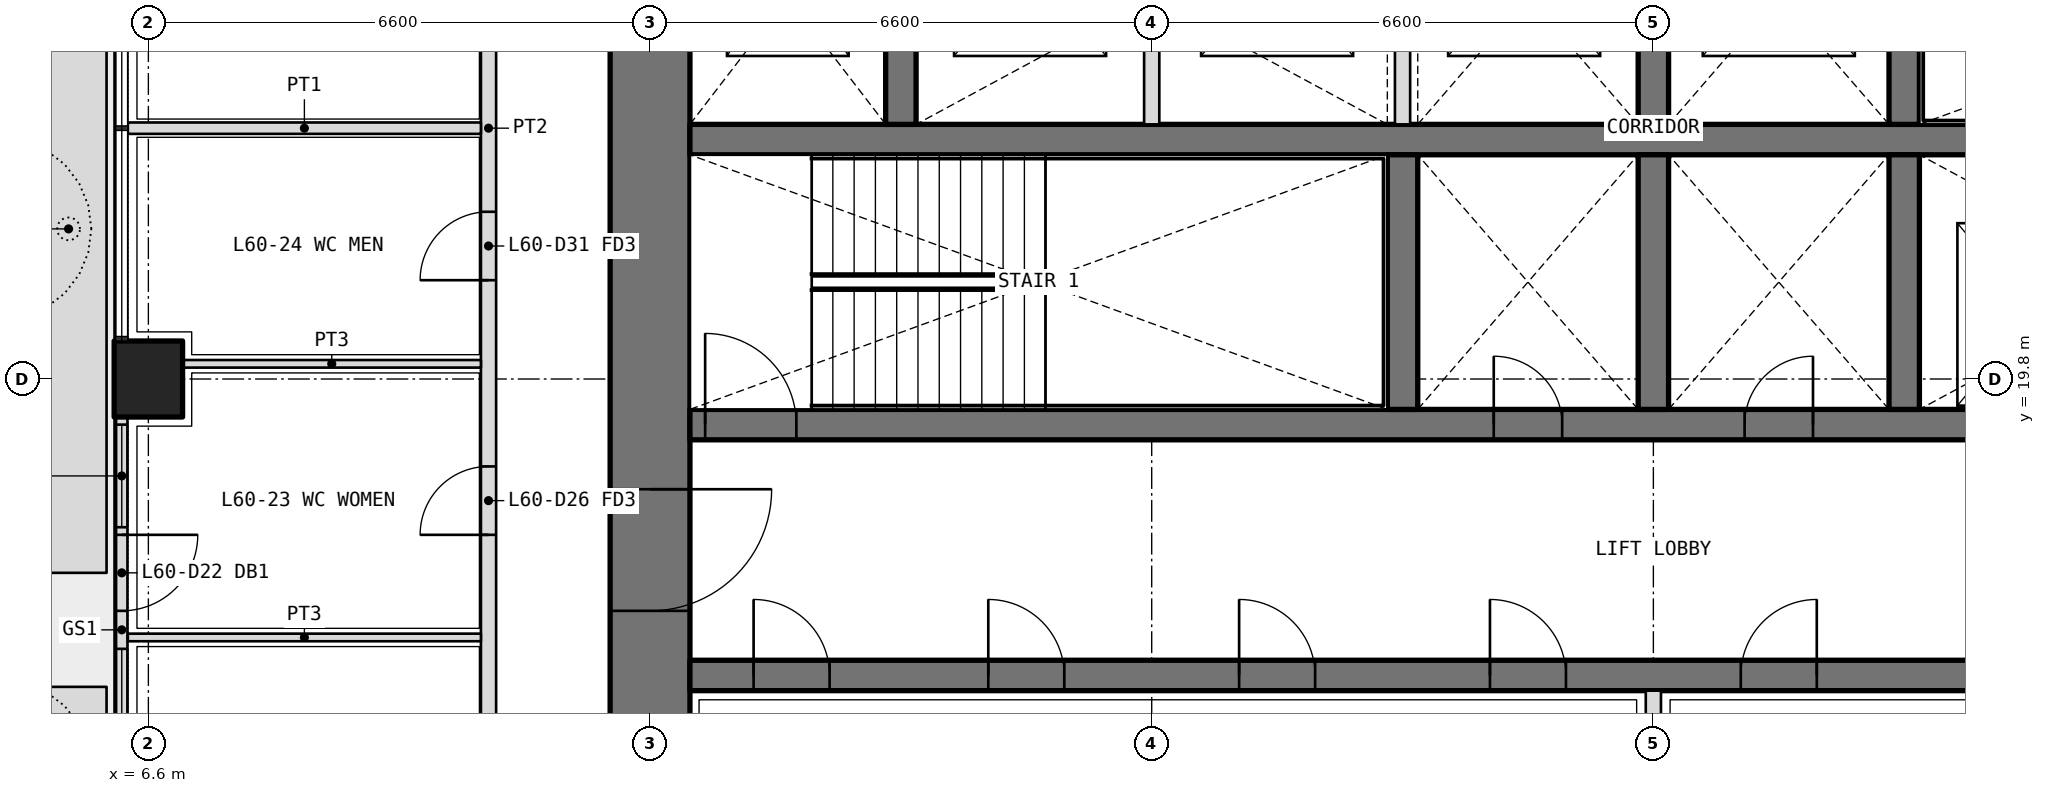
"""IFC4 building model, lengths in metres.
Left out: names, types, materials, properties, quantities, classifications, styles, units other than length and angle.
Written with IfcOpenShell. Run it as: python <this file> out.ifc"""

import sys

from ifc_helpers import new_model, si_unit, direction, frame, frame_2d, origin, origin_2d, place, context, subcontext, project, spatial, polyline, rectangle, outline, extrude, element, fill, save


model = new_model("IFC4")
c1 = context("Model", 3, precision=1e-05, world=origin(), true_north=direction((0.0, 1.0)))
c2 = subcontext(c1, "Body", "Model", "MODEL_VIEW")
j1 = project(units=[si_unit("LENGTHUNIT", "METRE"), si_unit("PLANEANGLEUNIT", "RADIAN")], contexts=[c1])
p1 = place(None, origin())
s1 = spatial("IfcSite", under=j1, at=p1, CompositionType="ELEMENT")
p2 = place(p1, origin())
s2 = spatial("IfcBuilding", under=s1, at=p2, CompositionType="ELEMENT")
p3 = place(p2, frame((0.0, 0.0, 262.8)))
s3 = spatial("IfcBuildingStorey", under=s2, at=p3, CompositionType="ELEMENT", Elevation=262.8)
p4 = place(p3, frame((6.6, 19.8, 0.0), z_axis=(0.0, 0.0, 1.0), x_axis=(0.0, 1.0, 0.0)))
e1 = element("IfcColumn", 1, at=p4, inside=s3, PredefinedType="COLUMN", context=c2, shape_type="SweptSolid", body=[
    extrude(rectangle(XDim=1.0, YDim=0.9, at=origin_2d()), origin(), (0.0, 0.0, 1.0), 4.2),
])
p5 = place(p3, origin())
e2 = element("IfcWall", 2, at=p5, inside=s3, PredefinedType="USERDEFINED", context=c2, shape_type="SweptSolid", body=[
    extrude(outline(polyline([(5.05, 13.3), (6.05, 13.3), (6.05, 15.75), (5.05, 15.75), (5.05, 13.3)]), holes=[polyline([(5.2, 13.45), (5.9, 13.45), (5.9, 15.6), (5.2, 15.6), (5.2, 13.45)])]), origin(), (0.0, 0.0, 1.0), 1.05),
])
p6 = place(p3, origin())
e3 = element("IfcWall", 3, at=p6, inside=s3, PredefinedType="USERDEFINED", context=c2, shape_type="SweptSolid", body=[
    extrude(outline(polyline([(5.05, 17.25), (6.05, 17.25), (6.05, 26.3), (5.05, 26.3), (5.05, 17.25)]), holes=[polyline([(5.2, 17.4), (5.9, 17.4), (5.9, 26.15), (5.2, 26.15), (5.2, 17.4)])]), origin(), (0.0, 0.0, 1.0), 1.05),
])
p7 = place(p3, frame((6.25, 19.3, 0.0), z_axis=(0.0, 0.0, 1.0), x_axis=(0.0, -1.0, 0.0)))
e4 = element("IfcWall", 4, at=p7, inside=s3, PredefinedType="SOLIDWALL", context=c2, shape_type="SweptSolid", body=[
    extrude(rectangle(XDim=5.6, YDim=0.15, at=frame_2d((2.8, 0.0))), origin(), (0.0, 0.0, 1.0), 2.7),
])
p8 = place(p7, frame((1.55, 0.0, 0.0)))
e5 = element("IfcOpeningElement", 5, at=p8, cuts=e4, PredefinedType="OPENING", context=c2, shape_type="SweptSolid", body=[
    extrude(rectangle(XDim=1.0, YDim=2.4, at=frame_2d((0.5, 1.2))), frame((0.0, 0.085, 0.0), z_axis=(0.0, -1.0, 0.0), x_axis=(1.0, 0.0, 0.0)), (0.0, 0.0, 1.0), 0.17),
])
p9 = place(p7, frame((0.1, 0.0, 0.1)))
e6 = element("IfcOpeningElement", 6, at=p9, cuts=e4, PredefinedType="OPENING", context=c2, shape_type="SweptSolid", body=[
    extrude(rectangle(XDim=1.35, YDim=2.3, at=frame_2d((0.675, 1.15))), frame((0.0, 0.085, 0.0), z_axis=(0.0, -1.0, 0.0), x_axis=(1.0, 0.0, 0.0)), (0.0, 0.0, 1.0), 0.17),
])
p10 = place(p7, frame((3.05, 0.0, 0.1)))
e7 = element("IfcOpeningElement", 7, at=p10, cuts=e4, PredefinedType="OPENING", context=c2, shape_type="SweptSolid", body=[
    extrude(rectangle(XDim=2.45, YDim=2.3, at=frame_2d((1.225, 1.15))), frame((0.0, 0.085, 0.0), z_axis=(0.0, -1.0, 0.0), x_axis=(1.0, 0.0, 0.0)), (0.0, 0.0, 1.0), 0.17),
])
p11 = place(p3, frame((13.2, 32.475, 0.0), z_axis=(0.0, 0.0, 1.0), x_axis=(0.0, -1.0, 0.0)))
e8 = element("IfcWall", 8, at=p11, inside=s3, PredefinedType="SHEAR", context=c2, shape_type="SweptSolid", body=[
    extrude(rectangle(XDim=18.75, YDim=1.05, at=frame_2d((9.375, 0.0))), origin(), (0.0, 0.0, 1.0), 4.2),
])
p12 = place(p11, frame((14.125, 0.0, 0.0)))
e9 = element("IfcOpeningElement", 9, at=p12, cuts=e8, PredefinedType="OPENING", context=c2, shape_type="SweptSolid", body=[
    extrude(rectangle(XDim=1.6, YDim=2.1, at=frame_2d((0.8, 1.05))), frame((0.0, 0.535, 0.0), z_axis=(0.0, -1.0, 0.0), x_axis=(1.0, 0.0, 0.0)), (0.0, 0.0, 1.0), 1.07),
])
p13 = place(p11, frame((3.325, 0.0, 0.0)))
e10 = element("IfcOpeningElement", 10, at=p13, cuts=e8, PredefinedType="OPENING", context=c2, shape_type="SweptSolid", body=[
    extrude(rectangle(XDim=1.6, YDim=2.1, at=frame_2d((0.8, 1.05))), frame((0.0, 0.535, 0.0), z_axis=(0.0, -1.0, 0.0), x_axis=(1.0, 0.0, 0.0)), (0.0, 0.0, 1.0), 1.07),
])
p14 = place(p3, frame((13.725, 15.9, 0.0), z_axis=(0.0, 0.0, 1.0), x_axis=(1.0, 0.0, 0.0)))
e11 = element("IfcWall", 11, at=p14, inside=s3, PredefinedType="SHEAR", context=c2, shape_type="SweptSolid", body=[
    extrude(rectangle(XDim=25.35, YDim=0.4, at=frame_2d((12.675, 0.0))), origin(), (0.0, 0.0, 1.0), 4.2),
])
p15 = place(p14, frame((0.837, 0.0, 0.0)))
e12 = element("IfcOpeningElement", 12, at=p15, cuts=e11, PredefinedType="OPENING", context=c2, shape_type="SweptSolid", body=[
    extrude(rectangle(XDim=1.0, YDim=2.1, at=frame_2d((0.5, 1.05))), frame((0.0, 0.21, 0.0), z_axis=(0.0, -1.0, 0.0), x_axis=(1.0, 0.0, 0.0)), (0.0, 0.0, 1.0), 0.42),
])
p16 = place(p14, frame((3.925, 0.0, 0.0)))
e13 = element("IfcOpeningElement", 13, at=p16, cuts=e11, PredefinedType="OPENING", context=c2, shape_type="SweptSolid", body=[
    extrude(rectangle(XDim=1.0, YDim=2.1, at=frame_2d((0.5, 1.05))), frame((0.0, 0.21, 0.0), z_axis=(0.0, -1.0, 0.0), x_axis=(1.0, 0.0, 0.0)), (0.0, 0.0, 1.0), 0.42),
])
p17 = place(p14, frame((7.225, 0.0, 0.0)))
e14 = element("IfcOpeningElement", 14, at=p17, cuts=e11, PredefinedType="OPENING", context=c2, shape_type="SweptSolid", body=[
    extrude(rectangle(XDim=1.0, YDim=2.1, at=frame_2d((0.5, 1.05))), frame((0.0, 0.21, 0.0), z_axis=(0.0, -1.0, 0.0), x_axis=(1.0, 0.0, 0.0)), (0.0, 0.0, 1.0), 0.42),
])
p18 = place(p14, frame((10.525, 0.0, 0.0)))
e15 = element("IfcOpeningElement", 15, at=p18, cuts=e11, PredefinedType="OPENING", context=c2, shape_type="SweptSolid", body=[
    extrude(rectangle(XDim=1.0, YDim=2.1, at=frame_2d((0.5, 1.05))), frame((0.0, 0.21, 0.0), z_axis=(0.0, -1.0, 0.0), x_axis=(1.0, 0.0, 0.0)), (0.0, 0.0, 1.0), 0.42),
])
p19 = place(p14, frame((13.825, 0.0, 0.0)))
e16 = element("IfcOpeningElement", 16, at=p19, cuts=e11, PredefinedType="OPENING", context=c2, shape_type="SweptSolid", body=[
    extrude(rectangle(XDim=1.0, YDim=2.1, at=frame_2d((0.5, 1.05))), frame((0.0, 0.21, 0.0), z_axis=(0.0, -1.0, 0.0), x_axis=(1.0, 0.0, 0.0)), (0.0, 0.0, 1.0), 0.42),
])
p20 = place(p14, frame((17.125, 0.0, 0.0)))
e17 = element("IfcOpeningElement", 17, at=p20, cuts=e11, PredefinedType="OPENING", context=c2, shape_type="SweptSolid", body=[
    extrude(rectangle(XDim=1.0, YDim=2.1, at=frame_2d((0.5, 1.05))), frame((0.0, 0.21, 0.0), z_axis=(0.0, -1.0, 0.0), x_axis=(1.0, 0.0, 0.0)), (0.0, 0.0, 1.0), 0.42),
])
p21 = place(p14, frame((20.425, 0.0, 0.0)))
e18 = element("IfcOpeningElement", 18, at=p21, cuts=e11, PredefinedType="OPENING", context=c2, shape_type="SweptSolid", body=[
    extrude(rectangle(XDim=1.0, YDim=2.1, at=frame_2d((0.5, 1.05))), frame((0.0, 0.21, 0.0), z_axis=(0.0, -1.0, 0.0), x_axis=(1.0, 0.0, 0.0)), (0.0, 0.0, 1.0), 0.42),
])
p22 = place(p14, frame((23.512, 0.0, 0.0)))
e19 = element("IfcOpeningElement", 19, at=p22, cuts=e11, PredefinedType="OPENING", context=c2, shape_type="SweptSolid", body=[
    extrude(rectangle(XDim=1.0, YDim=2.1, at=frame_2d((0.5, 1.05))), frame((0.0, 0.21, 0.0), z_axis=(0.0, -1.0, 0.0), x_axis=(1.0, 0.0, 0.0)), (0.0, 0.0, 1.0), 0.42),
])
p23 = place(p3, frame((13.725, 19.2, 0.0), z_axis=(0.0, 0.0, 1.0), x_axis=(1.0, 0.0, 0.0)))
e20 = element("IfcWall", 20, at=p23, inside=s3, PredefinedType="SHEAR", context=c2, shape_type="SweptSolid", body=[
    extrude(rectangle(XDim=25.35, YDim=0.4, at=frame_2d((12.675, 0.0))), origin(), (0.0, 0.0, 1.0), 4.2),
])
p24 = place(p23, frame((10.575, 0.0, 0.0)))
e21 = element("IfcOpeningElement", 21, at=p24, cuts=e20, PredefinedType="OPENING", context=c2, shape_type="SweptSolid", body=[
    extrude(rectangle(XDim=0.9, YDim=2.1, at=frame_2d((0.45, 1.05))), frame((0.0, 0.21, 0.0), z_axis=(0.0, -1.0, 0.0), x_axis=(1.0, 0.0, 0.0)), (0.0, 0.0, 1.0), 0.42),
])
p25 = place(p23, frame((13.875, 0.0, 0.0)))
e22 = element("IfcOpeningElement", 22, at=p25, cuts=e20, PredefinedType="OPENING", context=c2, shape_type="SweptSolid", body=[
    extrude(rectangle(XDim=0.9, YDim=2.1, at=frame_2d((0.45, 1.05))), frame((0.0, 0.21, 0.0), z_axis=(0.0, -1.0, 0.0), x_axis=(1.0, 0.0, 0.0)), (0.0, 0.0, 1.0), 0.42),
])
p26 = place(p23, frame((0.2, 0.0, 0.0)))
e23 = element("IfcOpeningElement", 23, at=p26, cuts=e20, PredefinedType="OPENING", context=c2, shape_type="SweptSolid", body=[
    extrude(rectangle(XDim=1.2, YDim=2.1, at=frame_2d((0.6, 1.05))), frame((0.0, 0.21, 0.0), z_axis=(0.0, -1.0, 0.0), x_axis=(1.0, 0.0, 0.0)), (0.0, 0.0, 1.0), 0.42),
])
p27 = place(p23, frame((23.512, 0.0, 0.0)))
e24 = element("IfcOpeningElement", 24, at=p27, cuts=e20, PredefinedType="OPENING", context=c2, shape_type="SweptSolid", body=[
    extrude(rectangle(XDim=1.1, YDim=2.1, at=frame_2d((0.55, 1.05))), frame((0.0, 0.21, 0.0), z_axis=(0.0, -1.0, 0.0), x_axis=(1.0, 0.0, 0.0)), (0.0, 0.0, 1.0), 0.42),
])
p28 = place(p23, frame((17.125, 0.0, 0.0)))
e25 = element("IfcOpeningElement", 25, at=p28, cuts=e20, PredefinedType="OPENING", context=c2, shape_type="SweptSolid", body=[
    extrude(rectangle(XDim=1.1, YDim=2.1, at=frame_2d((0.55, 1.05))), frame((0.0, 0.21, 0.0), z_axis=(0.0, -1.0, 0.0), x_axis=(1.0, 0.0, 0.0)), (0.0, 0.0, 1.0), 0.42),
])
p29 = place(p23, frame((20.325, 0.0, 0.0)))
e26 = element("IfcOpeningElement", 26, at=p29, cuts=e20, PredefinedType="OPENING", context=c2, shape_type="SweptSolid", body=[
    extrude(rectangle(XDim=1.1, YDim=2.1, at=frame_2d((0.55, 1.05))), frame((0.0, 0.21, 0.0), z_axis=(0.0, -1.0, 0.0), x_axis=(1.0, 0.0, 0.0)), (0.0, 0.0, 1.0), 0.42),
])
p30 = place(p3, frame((13.725, 22.95, 0.0), z_axis=(0.0, 0.0, 1.0), x_axis=(1.0, 0.0, 0.0)))
e27 = element("IfcWall", 27, at=p30, inside=s3, PredefinedType="SHEAR", context=c2, shape_type="SweptSolid", body=[
    extrude(rectangle(XDim=25.35, YDim=0.4, at=frame_2d((12.675, 0.0))), origin(), (0.0, 0.0, 1.0), 4.2),
])
for number, where, z_axis, x_axis in (
    (28, (23.1, 19.4, 0.0), (0.0, 0.0, 1.0), (0.0, 1.0, 0.0)),
    (29, (26.4, 19.4, 0.0), (0.0, 0.0, 1.0), (0.0, 1.0, 0.0)),
    (30, (29.7, 19.4, 0.0), (0.0, 0.0, 1.0), (0.0, 1.0, 0.0)),
    (31, (16.5, 23.15, 0.0), (0.0, 0.0, 1.0), (0.0, 1.0, 0.0)),
    (32, (26.4, 23.15, 0.0), (0.0, 0.0, 1.0), (0.0, 1.0, 0.0)),
    (33, (29.7, 23.15, 0.0), (0.0, 0.0, 1.0), (0.0, 1.0, 0.0)),
):
    element("IfcWall", number, at=place(p3, frame(where, z_axis=z_axis, x_axis=x_axis)), inside=s3, PredefinedType="SHEAR", context=c2, shape_type="SweptSolid", body=[
        extrude(rectangle(XDim=3.35, YDim=0.4, at=frame_2d((1.675, 0.0))), origin(), (0.0, 0.0, 1.0), 4.2),
    ])
p31 = place(p3, frame((26.4, 13.725, 0.0), z_axis=(0.0, 0.0, 1.0), x_axis=(0.0, 1.0, 0.0)))
e34 = element("IfcWall", 34, at=p31, inside=s3, PredefinedType="PARTITIONING", context=c2, shape_type="SweptSolid", body=[
    extrude(rectangle(XDim=1.975, YDim=0.2, at=frame_2d((0.987, 0.0))), origin(), (0.0, 0.0, 1.0), 4.2),
])
for number, where, z_axis, x_axis in (
    (35, (19.8, 23.15, 0.0), (0.0, 0.0, 1.0), (0.0, 1.0, 0.0)),
    (36, (23.1, 23.15, 0.0), (0.0, 0.0, 1.0), (0.0, 1.0, 0.0)),
):
    element("IfcWall", number, at=place(p3, frame(where, z_axis=z_axis, x_axis=x_axis)), inside=s3, PredefinedType="PARTITIONING", context=c2, shape_type="SweptSolid", body=[
        extrude(rectangle(XDim=3.35, YDim=0.2, at=frame_2d((1.675, 0.0))), origin(), (0.0, 0.0, 1.0), 4.2),
    ])
p32 = place(p3, frame((11.075, 7.4, 0.0), z_axis=(0.0, 0.0, 1.0), x_axis=(0.0, 1.0, 0.0)))
e37 = element("IfcWall", 37, at=p32, inside=s3, PredefinedType="PARTITIONING", context=c2, shape_type="SweptSolid", body=[
    extrude(rectangle(XDim=31.4, YDim=0.2, at=frame_2d((15.7, 0.0))), origin(), (0.0, 0.0, 1.0), 3.0),
])
p33 = place(p32, frame((2.25, 0.0, 0.0)))
e38 = element("IfcOpeningElement", 38, at=p33, cuts=e37, PredefinedType="OPENING", context=c2, shape_type="SweptSolid", body=[
    extrude(rectangle(XDim=1.2, YDim=2.1, at=frame_2d((0.6, 1.05))), frame((0.0, 0.11, 0.0), z_axis=(0.0, -1.0, 0.0), x_axis=(1.0, 0.0, 0.0)), (0.0, 0.0, 1.0), 0.22),
])
p34 = place(p32, frame((6.9, 0.0, 0.0)))
e39 = element("IfcOpeningElement", 39, at=p34, cuts=e37, PredefinedType="OPENING", context=c2, shape_type="SweptSolid", body=[
    extrude(rectangle(XDim=1.0, YDim=2.1, at=frame_2d((0.5, 1.05))), frame((0.0, 0.11, 0.0), z_axis=(0.0, -1.0, 0.0), x_axis=(1.0, 0.0, 0.0)), (0.0, 0.0, 1.0), 0.22),
])
p35 = place(p32, frame((10.35, 0.0, 0.0)))
e40 = element("IfcOpeningElement", 40, at=p35, cuts=e37, PredefinedType="OPENING", context=c2, shape_type="SweptSolid", body=[
    extrude(rectangle(XDim=0.9, YDim=2.1, at=frame_2d((0.45, 1.05))), frame((0.0, 0.11, 0.0), z_axis=(0.0, -1.0, 0.0), x_axis=(1.0, 0.0, 0.0)), (0.0, 0.0, 1.0), 0.22),
])
p36 = place(p32, frame((13.7, 0.0, 0.0)))
e41 = element("IfcOpeningElement", 41, at=p36, cuts=e37, PredefinedType="OPENING", context=c2, shape_type="SweptSolid", body=[
    extrude(rectangle(XDim=0.9, YDim=2.1, at=frame_2d((0.45, 1.05))), frame((0.0, 0.11, 0.0), z_axis=(0.0, -1.0, 0.0), x_axis=(1.0, 0.0, 0.0)), (0.0, 0.0, 1.0), 0.22),
])
p37 = place(p32, frame((16.85, 0.0, 0.0)))
e42 = element("IfcOpeningElement", 42, at=p37, cuts=e37, PredefinedType="OPENING", context=c2, shape_type="SweptSolid", body=[
    extrude(rectangle(XDim=1.0, YDim=2.1, at=frame_2d((0.5, 1.05))), frame((0.0, 0.11, 0.0), z_axis=(0.0, -1.0, 0.0), x_axis=(1.0, 0.0, 0.0)), (0.0, 0.0, 1.0), 0.22),
])
p38 = place(p32, frame((24.75, 0.0, 0.0)))
e43 = element("IfcOpeningElement", 43, at=p38, cuts=e37, PredefinedType="OPENING", context=c2, shape_type="SweptSolid", body=[
    extrude(rectangle(XDim=1.0, YDim=2.1, at=frame_2d((0.5, 1.05))), frame((0.0, 0.11, 0.0), z_axis=(0.0, -1.0, 0.0), x_axis=(1.0, 0.0, 0.0)), (0.0, 0.0, 1.0), 0.22),
])
p39 = place(p3, frame((6.33, 16.4, 0.0), z_axis=(0.0, 0.0, 1.0), x_axis=(1.0, 0.0, 0.0)))
e44 = element("IfcWall", 44, at=p39, inside=s3, PredefinedType="PARTITIONING", context=c2, shape_type="SweptSolid", body=[
    extrude(rectangle(XDim=4.645, YDim=0.1, at=frame_2d((2.323, 0.0))), origin(), (0.0, 0.0, 1.0), 2.7),
])
p40 = place(p3, frame((7.05, 20.0, 0.0), z_axis=(0.0, 0.0, 1.0), x_axis=(1.0, 0.0, 0.0)))
e45 = element("IfcWall", 45, at=p40, inside=s3, PredefinedType="PARTITIONING", context=c2, shape_type="SweptSolid", body=[
    extrude(rectangle(XDim=3.925, YDim=0.1, at=frame_2d((1.962, 0.0))), origin(), (0.0, 0.0, 1.0), 3.0),
])
p41 = place(p3, frame((6.33, 23.1, 0.0), z_axis=(0.0, 0.0, 1.0), x_axis=(1.0, 0.0, 0.0)))
e46 = element("IfcWall", 46, at=p41, inside=s3, PredefinedType="PARTITIONING", context=c2, shape_type="SweptSolid", body=[
    extrude(rectangle(XDim=4.645, YDim=0.15, at=frame_2d((2.323, 0.0))), origin(), (0.0, 0.0, 1.0), 2.7),
])
p42 = place(p8, origin())
e47 = element("IfcDoor", 47, at=p42, inside=s3, OperationType="SINGLE_SWING_LEFT", PredefinedType="DOOR", context=c2, shape_type="SweptSolid", body=[
    extrude(rectangle(XDim=1.0, YDim=2.4, at=frame_2d((0.5, 1.2))), frame((0.0, 0.025, 0.0), z_axis=(0.0, -1.0, 0.0), x_axis=(1.0, 0.0, 0.0)), (0.0, 0.0, 1.0), 0.05),
])
fill(e5, e47)
p43 = place(p9, origin())
e48 = element("IfcWindow", 48, at=p43, inside=s3, PartitioningType="SINGLE_PANEL", PredefinedType="WINDOW", context=c2, shape_type="SweptSolid", body=[
    extrude(rectangle(XDim=1.35, YDim=2.3, at=frame_2d((0.675, 1.15))), frame((0.0, 0.03, 0.0), z_axis=(0.0, -1.0, 0.0), x_axis=(1.0, 0.0, 0.0)), (0.0, 0.0, 1.0), 0.06),
])
fill(e6, e48)
p44 = place(p10, origin())
e49 = element("IfcWindow", 49, at=p44, inside=s3, PartitioningType="SINGLE_PANEL", PredefinedType="WINDOW", context=c2, shape_type="SweptSolid", body=[
    extrude(rectangle(XDim=2.45, YDim=2.3, at=frame_2d((1.225, 1.15))), frame((0.0, 0.03, 0.0), z_axis=(0.0, -1.0, 0.0), x_axis=(1.0, 0.0, 0.0)), (0.0, 0.0, 1.0), 0.06),
])
fill(e7, e49)
p45 = place(p35, origin())
e50 = element("IfcDoor", 50, at=p45, inside=s3, OperationType="SINGLE_SWING_LEFT", PredefinedType="DOOR", context=c2, shape_type="SweptSolid", body=[
    extrude(rectangle(XDim=0.9, YDim=2.1, at=frame_2d((0.45, 1.05))), frame((0.0, 0.025, 0.0), z_axis=(0.0, -1.0, 0.0), x_axis=(1.0, 0.0, 0.0)), (0.0, 0.0, 1.0), 0.05),
])
fill(e40, e50)
p46 = place(p36, origin())
e51 = element("IfcDoor", 51, at=p46, inside=s3, OperationType="SINGLE_SWING_LEFT", PredefinedType="DOOR", context=c2, shape_type="SweptSolid", body=[
    extrude(rectangle(XDim=0.9, YDim=2.1, at=frame_2d((0.45, 1.05))), frame((0.0, 0.025, 0.0), z_axis=(0.0, -1.0, 0.0), x_axis=(1.0, 0.0, 0.0)), (0.0, 0.0, 1.0), 0.05),
])
fill(e41, e51)
p47 = place(p24, origin())
e52 = element("IfcDoor", 52, at=p47, inside=s3, OperationType="SINGLE_SWING_LEFT", PredefinedType="DOOR", context=c2, shape_type="SweptSolid", body=[
    extrude(rectangle(XDim=0.9, YDim=2.1, at=frame_2d((0.45, 1.05))), frame((0.0, 0.025, 0.0), z_axis=(0.0, -1.0, 0.0), x_axis=(1.0, 0.0, 0.0)), (0.0, 0.0, 1.0), 0.05),
])
fill(e21, e52)
p48 = place(p25, origin())
e53 = element("IfcDoor", 53, at=p48, inside=s3, OperationType="SINGLE_SWING_RIGHT", PredefinedType="DOOR", context=c2, shape_type="SweptSolid", body=[
    extrude(rectangle(XDim=0.9, YDim=2.1, at=frame_2d((0.45, 1.05))), frame((0.0, 0.025, 0.0), z_axis=(0.0, -1.0, 0.0), x_axis=(1.0, 0.0, 0.0)), (0.0, 0.0, 1.0), 0.05),
])
fill(e22, e53)
p49 = place(p15, origin())
e54 = element("IfcDoor", 54, at=p49, inside=s3, OperationType="SINGLE_SWING_LEFT", PredefinedType="DOOR", context=c2, shape_type="SweptSolid", body=[
    extrude(rectangle(XDim=1.0, YDim=2.1, at=frame_2d((0.5, 1.05))), frame((0.0, 0.025, 0.0), z_axis=(0.0, -1.0, 0.0), x_axis=(1.0, 0.0, 0.0)), (0.0, 0.0, 1.0), 0.05),
])
fill(e12, e54)
p50 = place(p16, origin())
e55 = element("IfcDoor", 55, at=p50, inside=s3, OperationType="SINGLE_SWING_LEFT", PredefinedType="DOOR", context=c2, shape_type="SweptSolid", body=[
    extrude(rectangle(XDim=1.0, YDim=2.1, at=frame_2d((0.5, 1.05))), frame((0.0, 0.025, 0.0), z_axis=(0.0, -1.0, 0.0), x_axis=(1.0, 0.0, 0.0)), (0.0, 0.0, 1.0), 0.05),
])
fill(e13, e55)
p51 = place(p17, origin())
e56 = element("IfcDoor", 56, at=p51, inside=s3, OperationType="SINGLE_SWING_LEFT", PredefinedType="DOOR", context=c2, shape_type="SweptSolid", body=[
    extrude(rectangle(XDim=1.0, YDim=2.1, at=frame_2d((0.5, 1.05))), frame((0.0, 0.025, 0.0), z_axis=(0.0, -1.0, 0.0), x_axis=(1.0, 0.0, 0.0)), (0.0, 0.0, 1.0), 0.05),
])
fill(e14, e56)
p52 = place(p18, origin())
e57 = element("IfcDoor", 57, at=p52, inside=s3, OperationType="SINGLE_SWING_LEFT", PredefinedType="DOOR", context=c2, shape_type="SweptSolid", body=[
    extrude(rectangle(XDim=1.0, YDim=2.1, at=frame_2d((0.5, 1.05))), frame((0.0, 0.025, 0.0), z_axis=(0.0, -1.0, 0.0), x_axis=(1.0, 0.0, 0.0)), (0.0, 0.0, 1.0), 0.05),
])
fill(e15, e57)
p53 = place(p19, origin())
e58 = element("IfcDoor", 58, at=p53, inside=s3, OperationType="SINGLE_SWING_RIGHT", PredefinedType="DOOR", context=c2, shape_type="SweptSolid", body=[
    extrude(rectangle(XDim=1.0, YDim=2.1, at=frame_2d((0.5, 1.05))), frame((0.0, 0.025, 0.0), z_axis=(0.0, -1.0, 0.0), x_axis=(1.0, 0.0, 0.0)), (0.0, 0.0, 1.0), 0.05),
])
fill(e16, e58)
p54 = place(p26, origin())
e59 = element("IfcDoor", 59, at=p54, inside=s3, OperationType="SINGLE_SWING_LEFT", PredefinedType="DOOR", context=c2, shape_type="SweptSolid", body=[
    extrude(rectangle(XDim=1.2, YDim=2.1, at=frame_2d((0.6, 1.05))), frame((0.0, 0.025, 0.0), z_axis=(0.0, -1.0, 0.0), x_axis=(1.0, 0.0, 0.0)), (0.0, 0.0, 1.0), 0.05),
])
fill(e23, e59)
p55 = place(p12, origin())
e60 = element("IfcDoor", 60, at=p55, inside=s3, OperationType="DOUBLE_DOOR_DOUBLE_SWING", PredefinedType="DOOR", context=c2, shape_type="SweptSolid", body=[
    extrude(rectangle(XDim=1.6, YDim=2.1, at=frame_2d((0.8, 1.05))), frame((0.0, 0.025, 0.0), z_axis=(0.0, -1.0, 0.0), x_axis=(1.0, 0.0, 0.0)), (0.0, 0.0, 1.0), 0.05),
])
fill(e9, e60)
save(model, sys.argv[1])
